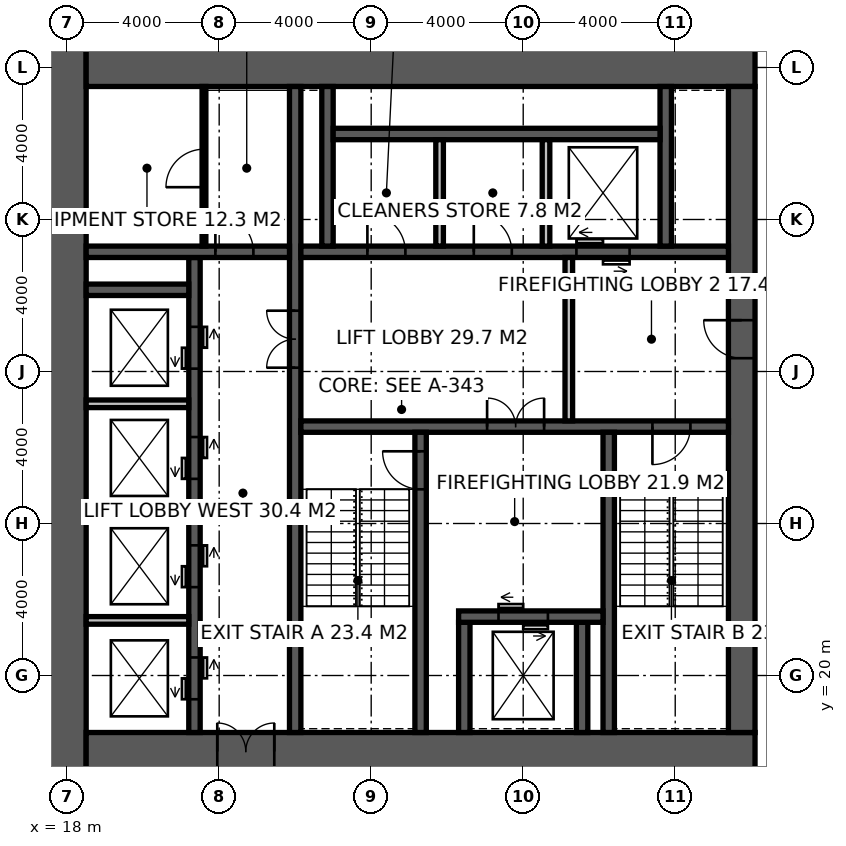
"""IFC4 building model, lengths in metres.
Left out: names, types, materials, properties, quantities, classifications, styles, units other than length and angle.
Written with IfcOpenShell. Run it as: python <this file> out.ifc"""

import sys

from ifc_helpers import new_model, si_unit, direction, frame, frame_2d, origin, place, context, subcontext, project, spatial, rectangle, extrude, element, fill, save


model = new_model("IFC4")
c1 = context("Model", 3, precision=1e-05, world=origin(), true_north=direction((0.0, 1.0)))
c2 = subcontext(c1, "Body", "Model", "MODEL_VIEW")
j1 = project(units=[si_unit("LENGTHUNIT", "METRE"), si_unit("PLANEANGLEUNIT", "RADIAN")], contexts=[c1])
p1 = place(None, origin())
s1 = spatial("IfcSite", under=j1, at=p1, CompositionType="ELEMENT")
p2 = place(p1, origin())
s2 = spatial("IfcBuilding", under=s1, at=p2, CompositionType="ELEMENT")
p3 = place(p2, frame((0.0, 0.0, 278.2)))
s3 = spatial("IfcBuildingStorey", under=s2, at=p3, CompositionType="ELEMENT", Elevation=278.2)
p4 = place(p3, frame((18.0, 17.5, -0.15), z_axis=(0.0, 0.0, 1.0), x_axis=(0.0, 1.0, 0.0)))
e1 = element("IfcWall", 1, at=p4, inside=s3, PredefinedType="SHEAR", context=c2, shape_type="SweptSolid", body=[
    extrude(rectangle(XDim=19.0, YDim=1.0, at=frame_2d((9.5, 0.0))), origin(), (0.0, 0.0, 1.0), 4.0),
])
p5 = place(p3, frame((18.5, 18.0, -0.15), z_axis=(0.0, 0.0, 1.0), x_axis=(1.0, 0.0, 0.0)))
e2 = element("IfcWall", 2, at=p5, inside=s3, PredefinedType="SHEAR", context=c2, shape_type="SweptSolid", body=[
    extrude(rectangle(XDim=17.6, YDim=1.0, at=frame_2d((8.8, 0.0))), origin(), (0.0, 0.0, 1.0), 4.0),
])
p6 = place(p5, frame((3.45, 0.0, 0.15)))
e3 = element("IfcOpeningElement", 3, at=p6, cuts=e2, PredefinedType="OPENING", context=c2, shape_type="SweptSolid", body=[
    extrude(rectangle(XDim=1.5, YDim=2.4, at=frame_2d((0.75, 1.2))), frame((0.0, 0.51, 0.0), z_axis=(0.0, -1.0, 0.0), x_axis=(1.0, 0.0, 0.0)), (0.0, 0.0, 1.0), 1.02),
])
p7 = place(p3, frame((18.5, 36.0, -0.15), z_axis=(0.0, 0.0, 1.0), x_axis=(1.0, 0.0, 0.0)))
e4 = element("IfcWall", 4, at=p7, inside=s3, PredefinedType="SHEAR", context=c2, shape_type="SweptSolid", body=[
    extrude(rectangle(XDim=17.6, YDim=1.0, at=frame_2d((8.8, 0.0))), origin(), (0.0, 0.0, 1.0), 4.0),
])
p8 = place(p3, frame((35.75, 18.5, -0.15), z_axis=(0.0, 0.0, 1.0), x_axis=(0.0, 1.0, 0.0)))
e5 = element("IfcWall", 5, at=p8, inside=s3, PredefinedType="SHEAR", context=c2, shape_type="SweptSolid", body=[
    extrude(rectangle(XDim=17.0, YDim=0.7, at=frame_2d((8.5, 0.0))), origin(), (0.0, 0.0, 1.0), 4.0),
])
p9 = place(p8, frame((9.85, 0.0, 0.15)))
e6 = element("IfcOpeningElement", 6, at=p9, cuts=e5, PredefinedType="OPENING", context=c2, shape_type="SweptSolid", body=[
    extrude(rectangle(XDim=1.0, YDim=2.2, at=frame_2d((0.5, 1.1))), frame((0.0, 0.36, 0.0), z_axis=(0.0, -1.0, 0.0), x_axis=(1.0, 0.0, 0.0)), (0.0, 0.0, 1.0), 0.72),
])
p10 = place(p3, frame((24.0, 18.5, -0.15), z_axis=(0.0, 0.0, 1.0), x_axis=(0.0, 1.0, 0.0)))
e7 = element("IfcWall", 7, at=p10, inside=s3, PredefinedType="SHEAR", context=c2, shape_type="SweptSolid", body=[
    extrude(rectangle(XDim=17.0, YDim=0.3, at=frame_2d((8.5, 0.0))), origin(), (0.0, 0.0, 1.0), 4.0),
])
p11 = place(p10, frame((9.6, 0.0, 0.15)))
e8 = element("IfcOpeningElement", 8, at=p11, cuts=e7, PredefinedType="OPENING", context=c2, shape_type="SweptSolid", body=[
    extrude(rectangle(XDim=1.5, YDim=2.4, at=frame_2d((0.75, 1.2))), frame((0.0, 0.16, 0.0), z_axis=(0.0, -1.0, 0.0), x_axis=(1.0, 0.0, 0.0)), (0.0, 0.0, 1.0), 0.32),
])
p12 = place(p3, frame((24.15, 26.55, -0.15), z_axis=(0.0, 0.0, 1.0), x_axis=(1.0, 0.0, 0.0)))
e9 = element("IfcWall", 9, at=p12, inside=s3, PredefinedType="SHEAR", context=c2, shape_type="SweptSolid", body=[
    extrude(rectangle(XDim=11.25, YDim=0.3, at=frame_2d((5.625, 0.0))), origin(), (0.0, 0.0, 1.0), 4.0),
])
p13 = place(p12, frame((9.25, 0.0, 0.15)))
e10 = element("IfcOpeningElement", 10, at=p13, cuts=e9, PredefinedType="OPENING", context=c2, shape_type="SweptSolid", body=[
    extrude(rectangle(XDim=1.0, YDim=2.2, at=frame_2d((0.5, 1.1))), frame((0.0, 0.16, 0.0), z_axis=(0.0, -1.0, 0.0), x_axis=(1.0, 0.0, 0.0)), (0.0, 0.0, 1.0), 0.32),
])
p14 = place(p12, frame((4.9, 0.0, 0.15)))
e11 = element("IfcOpeningElement", 11, at=p14, cuts=e9, PredefinedType="OPENING", context=c2, shape_type="SweptSolid", body=[
    extrude(rectangle(XDim=1.5, YDim=2.4, at=frame_2d((0.75, 1.2))), frame((0.0, 0.16, 0.0), z_axis=(0.0, -1.0, 0.0), x_axis=(1.0, 0.0, 0.0)), (0.0, 0.0, 1.0), 0.32),
])
p15 = place(p3, frame((27.3, 18.5, -0.15), z_axis=(0.0, 0.0, 1.0), x_axis=(0.0, 1.0, 0.0)))
e12 = element("IfcWall", 12, at=p15, inside=s3, PredefinedType="SHEAR", context=c2, shape_type="SweptSolid", body=[
    extrude(rectangle(XDim=7.9, YDim=0.3, at=frame_2d((3.95, 0.0))), origin(), (0.0, 0.0, 1.0), 4.0),
])
p16 = place(p15, frame((6.4, 0.0, 0.15)))
e13 = element("IfcOpeningElement", 13, at=p16, cuts=e12, PredefinedType="OPENING", context=c2, shape_type="SweptSolid", body=[
    extrude(rectangle(XDim=1.0, YDim=2.2, at=frame_2d((0.5, 1.1))), frame((0.0, 0.16, 0.0), z_axis=(0.0, -1.0, 0.0), x_axis=(1.0, 0.0, 0.0)), (0.0, 0.0, 1.0), 0.32),
])
p17 = place(p3, frame((32.25, 18.5, -0.15), z_axis=(0.0, 0.0, 1.0), x_axis=(0.0, 1.0, 0.0)))
e14 = element("IfcWall", 14, at=p17, inside=s3, PredefinedType="SHEAR", context=c2, shape_type="SweptSolid", body=[
    extrude(rectangle(XDim=7.9, YDim=0.3, at=frame_2d((3.95, 0.0))), origin(), (0.0, 0.0, 1.0), 4.0),
])
for number, where, z_axis, x_axis in (
    (15, (28.45, 18.5, -0.15), (0.0, 0.0, 1.0), (0.0, 1.0, 0.0)),
    (16, (31.55, 18.5, -0.15), (0.0, 0.0, 1.0), (0.0, 1.0, 0.0)),
):
    element("IfcWall", number, at=place(p3, frame(where, z_axis=z_axis, x_axis=x_axis)), inside=s3, PredefinedType="SHEAR", context=c2, shape_type="SweptSolid", body=[
        extrude(rectangle(XDim=2.9, YDim=0.3, at=frame_2d((1.45, 0.0))), origin(), (0.0, 0.0, 1.0), 4.0),
    ])
p18 = place(p3, frame((28.3, 21.55, -0.15), z_axis=(0.0, 0.0, 1.0), x_axis=(1.0, 0.0, 0.0)))
e17 = element("IfcWall", 17, at=p18, inside=s3, PredefinedType="SHEAR", context=c2, shape_type="SweptSolid", body=[
    extrude(rectangle(XDim=3.8, YDim=0.3, at=frame_2d((1.9, 0.0))), origin(), (0.0, 0.0, 1.0), 4.0),
])
p19 = place(p18, frame((1.05, 0.0, 0.15)))
e18 = element("IfcOpeningElement", 18, at=p19, cuts=e17, PredefinedType="OPENING", context=c2, shape_type="SweptSolid", body=[
    extrude(rectangle(XDim=1.3, YDim=2.4, at=frame_2d((0.65, 1.2))), frame((0.0, 0.16, 0.0), z_axis=(0.0, -1.0, 0.0), x_axis=(1.0, 0.0, 0.0)), (0.0, 0.0, 1.0), 0.32),
])
p20 = place(p3, frame((24.15, 31.15, -0.15), z_axis=(0.0, 0.0, 1.0), x_axis=(1.0, 0.0, 0.0)))
e19 = element("IfcWall", 19, at=p20, inside=s3, PredefinedType="SHEAR", context=c2, shape_type="SweptSolid", body=[
    extrude(rectangle(XDim=11.25, YDim=0.3, at=frame_2d((5.625, 0.0))), origin(), (0.0, 0.0, 1.0), 4.0),
])
p21 = place(p20, frame((1.75, 0.0, 0.15)))
e20 = element("IfcOpeningElement", 20, at=p21, cuts=e19, PredefinedType="OPENING", context=c2, shape_type="SweptSolid", body=[
    extrude(rectangle(XDim=1.0, YDim=2.2, at=frame_2d((0.5, 1.1))), frame((0.0, 0.16, 0.0), z_axis=(0.0, -1.0, 0.0), x_axis=(1.0, 0.0, 0.0)), (0.0, 0.0, 1.0), 0.32),
])
p22 = place(p20, frame((4.55, 0.0, 0.15)))
e21 = element("IfcOpeningElement", 21, at=p22, cuts=e19, PredefinedType="OPENING", context=c2, shape_type="SweptSolid", body=[
    extrude(rectangle(XDim=1.0, YDim=2.2, at=frame_2d((0.5, 1.1))), frame((0.0, 0.16, 0.0), z_axis=(0.0, -1.0, 0.0), x_axis=(1.0, 0.0, 0.0)), (0.0, 0.0, 1.0), 0.32),
])
p23 = place(p20, frame((7.25, 0.0, 0.15)))
e22 = element("IfcOpeningElement", 22, at=p23, cuts=e19, PredefinedType="OPENING", context=c2, shape_type="SweptSolid", body=[
    extrude(rectangle(XDim=1.4, YDim=2.4, at=frame_2d((0.7, 1.2))), frame((0.0, 0.16, 0.0), z_axis=(0.0, -1.0, 0.0), x_axis=(1.0, 0.0, 0.0)), (0.0, 0.0, 1.0), 0.32),
])
p24 = place(p3, frame((21.35, 18.5, -0.15), z_axis=(0.0, 0.0, 1.0), x_axis=(0.0, 1.0, 0.0)))
e23 = element("IfcWall", 23, at=p24, inside=s3, PredefinedType="SHEAR", context=c2, shape_type="SweptSolid", body=[
    extrude(rectangle(XDim=12.5, YDim=0.3, at=frame_2d((6.25, 0.0))), origin(), (0.0, 0.0, 1.0), 4.0),
])
p25 = place(p24, frame((0.875, 0.0, 0.15)))
e24 = element("IfcOpeningElement", 24, at=p25, cuts=e23, PredefinedType="OPENING", context=c2, shape_type="SweptSolid", body=[
    extrude(rectangle(XDim=1.1, YDim=2.2, at=frame_2d((0.55, 1.1))), frame((0.0, 0.16, 0.0), z_axis=(0.0, -1.0, 0.0), x_axis=(1.0, 0.0, 0.0)), (0.0, 0.0, 1.0), 0.32),
])
p26 = place(p24, frame((3.825, 0.0, 0.15)))
e25 = element("IfcOpeningElement", 25, at=p26, cuts=e23, PredefinedType="OPENING", context=c2, shape_type="SweptSolid", body=[
    extrude(rectangle(XDim=1.1, YDim=2.2, at=frame_2d((0.55, 1.1))), frame((0.0, 0.16, 0.0), z_axis=(0.0, -1.0, 0.0), x_axis=(1.0, 0.0, 0.0)), (0.0, 0.0, 1.0), 0.32),
])
p27 = place(p24, frame((6.675, 0.0, 0.15)))
e26 = element("IfcOpeningElement", 26, at=p27, cuts=e23, PredefinedType="OPENING", context=c2, shape_type="SweptSolid", body=[
    extrude(rectangle(XDim=1.1, YDim=2.2, at=frame_2d((0.55, 1.1))), frame((0.0, 0.16, 0.0), z_axis=(0.0, -1.0, 0.0), x_axis=(1.0, 0.0, 0.0)), (0.0, 0.0, 1.0), 0.32),
])
p28 = place(p24, frame((9.575, 0.0, 0.15)))
e27 = element("IfcOpeningElement", 27, at=p28, cuts=e23, PredefinedType="OPENING", context=c2, shape_type="SweptSolid", body=[
    extrude(rectangle(XDim=1.1, YDim=2.2, at=frame_2d((0.55, 1.1))), frame((0.0, 0.16, 0.0), z_axis=(0.0, -1.0, 0.0), x_axis=(1.0, 0.0, 0.0)), (0.0, 0.0, 1.0), 0.32),
])
p29 = place(p3, frame((18.5, 31.15, -0.15), z_axis=(0.0, 0.0, 1.0), x_axis=(1.0, 0.0, 0.0)))
e28 = element("IfcWall", 28, at=p29, inside=s3, PredefinedType="SHEAR", context=c2, shape_type="SweptSolid", body=[
    extrude(rectangle(XDim=5.35, YDim=0.3, at=frame_2d((2.675, 0.0))), origin(), (0.0, 0.0, 1.0), 4.0),
])
p30 = place(p29, frame((3.4, 0.0, 0.15)))
e29 = element("IfcOpeningElement", 29, at=p30, cuts=e28, PredefinedType="OPENING", context=c2, shape_type="SweptSolid", body=[
    extrude(rectangle(XDim=1.0, YDim=2.2, at=frame_2d((0.5, 1.1))), frame((0.0, 0.16, 0.0), z_axis=(0.0, -1.0, 0.0), x_axis=(1.0, 0.0, 0.0)), (0.0, 0.0, 1.0), 0.32),
])
p31 = place(p3, frame((18.5, 30.15, -0.15), z_axis=(0.0, 0.0, 1.0), x_axis=(1.0, 0.0, 0.0)))
e30 = element("IfcWall", 30, at=p31, inside=s3, PredefinedType="SHEAR", context=c2, shape_type="SweptSolid", body=[
    extrude(rectangle(XDim=2.7, YDim=0.3, at=frame_2d((1.35, 0.0))), origin(), (0.0, 0.0, 1.0), 4.0),
])
for number, where, z_axis, x_axis in (
    (31, (24.85, 31.3, -0.15), (0.0, 0.0, 1.0), (0.0, 1.0, 0.0)),
    (32, (33.75, 31.3, -0.15), (0.0, 0.0, 1.0), (0.0, 1.0, 0.0)),
):
    element("IfcWall", number, at=place(p3, frame(where, z_axis=z_axis, x_axis=x_axis)), inside=s3, PredefinedType="SHEAR", context=c2, shape_type="SweptSolid", body=[
        extrude(rectangle(XDim=4.2, YDim=0.3, at=frame_2d((2.1, 0.0))), origin(), (0.0, 0.0, 1.0), 4.0),
    ])
p32 = place(p3, frame((25.0, 34.25, -0.15), z_axis=(0.0, 0.0, 1.0), x_axis=(1.0, 0.0, 0.0)))
e33 = element("IfcWall", 33, at=p32, inside=s3, PredefinedType="SHEAR", context=c2, shape_type="SweptSolid", body=[
    extrude(rectangle(XDim=8.6, YDim=0.3, at=frame_2d((4.3, 0.0))), origin(), (0.0, 0.0, 1.0), 4.0),
])
for number, where, z_axis, x_axis in (
    (34, (27.8, 31.3, -0.15), (0.0, 0.0, 1.0), (0.0, 1.0, 0.0)),
    (35, (30.6, 31.3, -0.15), (0.0, 0.0, 1.0), (0.0, 1.0, 0.0)),
):
    element("IfcWall", number, at=place(p3, frame(where, z_axis=z_axis, x_axis=x_axis)), inside=s3, PredefinedType="SOLIDWALL", context=c2, shape_type="SweptSolid", body=[
        extrude(rectangle(XDim=2.8, YDim=0.2, at=frame_2d((1.4, 0.0))), origin(), (0.0, 0.0, 1.0), 4.0),
    ])
for number, where, z_axis, x_axis in (
    (36, (18.5, 21.45, -0.15), (0.0, 0.0, 1.0), (1.0, 0.0, 0.0)),
    (37, (18.5, 24.3, -0.15), (0.0, 0.0, 1.0), (1.0, 0.0, 0.0)),
    (38, (18.5, 27.15, -0.15), (0.0, 0.0, 1.0), (1.0, 0.0, 0.0)),
):
    element("IfcWall", number, at=place(p3, frame(where, z_axis=z_axis, x_axis=x_axis)), inside=s3, PredefinedType="SOLIDWALL", context=c2, shape_type="SweptSolid", body=[
        extrude(rectangle(XDim=2.7, YDim=0.2, at=frame_2d((1.35, 0.0))), origin(), (0.0, 0.0, 1.0), 4.0),
    ])
p33 = place(p3, frame((31.2, 26.7, 0.0), z_axis=(0.0, 0.0, 1.0), x_axis=(0.0, 1.0, 0.0)))
e39 = element("IfcWall", 39, at=p33, inside=s3, PredefinedType="SOLIDWALL", context=c2, shape_type="SweptSolid", body=[
    extrude(rectangle(XDim=4.3, YDim=0.2, at=frame_2d((2.15, 0.0))), origin(), (0.0, 0.0, 1.0), 3.85),
])
p34 = place(p3, frame((21.6, 31.3, 0.0), z_axis=(0.0, 0.0, 1.0), x_axis=(0.0, 1.0, 0.0)))
e40 = element("IfcWall", 40, at=p34, inside=s3, PredefinedType="PARTITIONING", context=c2, shape_type="SweptSolid", body=[
    extrude(rectangle(XDim=4.2, YDim=0.1, at=frame_2d((2.1, 0.0))), origin(), (0.0, 0.0, 1.0), 3.85),
])
p35 = place(p34, frame((1.55, 0.0, 0.0)))
e41 = element("IfcOpeningElement", 41, at=p35, cuts=e40, PredefinedType="OPENING", context=c2, shape_type="SweptSolid", body=[
    extrude(rectangle(XDim=1.0, YDim=2.2, at=frame_2d((0.5, 1.1))), frame((0.0, 0.06, 0.0), z_axis=(0.0, -1.0, 0.0), x_axis=(1.0, 0.0, 0.0)), (0.0, 0.0, 1.0), 0.12),
])
p36 = place(p16, origin())
e42 = element("IfcDoor", 42, at=p36, inside=s3, OperationType="SINGLE_SWING_RIGHT", PredefinedType="DOOR", context=c2, shape_type="SweptSolid", body=[
    extrude(rectangle(XDim=1.0, YDim=2.2, at=frame_2d((0.5, 1.1))), frame((0.0, 0.025, 0.0), z_axis=(0.0, -1.0, 0.0), x_axis=(1.0, 0.0, 0.0)), (0.0, 0.0, 1.0), 0.05),
])
fill(e13, e42)
p37 = place(p13, frame((1.0, 0.0, 0.0), z_axis=(0.0, 0.0, 1.0), x_axis=(-1.0, 0.0, 0.0)))
e43 = element("IfcDoor", 43, at=p37, inside=s3, OperationType="SINGLE_SWING_RIGHT", PredefinedType="DOOR", context=c2, shape_type="SweptSolid", body=[
    extrude(rectangle(XDim=1.0, YDim=2.2, at=frame_2d((0.5, 1.1))), frame((0.0, 0.025, 0.0), z_axis=(0.0, -1.0, 0.0), x_axis=(1.0, 0.0, 0.0)), (0.0, 0.0, 1.0), 0.05),
])
fill(e10, e43)
p38 = place(p9, origin())
e44 = element("IfcDoor", 44, at=p38, inside=s3, OperationType="SINGLE_SWING_RIGHT", PredefinedType="DOOR", context=c2, shape_type="SweptSolid", body=[
    extrude(rectangle(XDim=1.0, YDim=2.2, at=frame_2d((0.5, 1.1))), frame((0.0, 0.025, 0.0), z_axis=(0.0, -1.0, 0.0), x_axis=(1.0, 0.0, 0.0)), (0.0, 0.0, 1.0), 0.05),
])
fill(e6, e44)
p39 = place(p14, origin())
e45 = element("IfcDoor", 45, at=p39, inside=s3, OperationType="DOUBLE_DOOR_DOUBLE_SWING", PredefinedType="DOOR", context=c2, shape_type="SweptSolid", body=[
    extrude(rectangle(XDim=1.5, YDim=2.4, at=frame_2d((0.75, 1.2))), frame((0.0, 0.025, 0.0), z_axis=(0.0, -1.0, 0.0), x_axis=(1.0, 0.0, 0.0)), (0.0, 0.0, 1.0), 0.05),
])
fill(e11, e45)
p40 = place(p11, origin())
e46 = element("IfcDoor", 46, at=p40, inside=s3, OperationType="DOUBLE_DOOR_DOUBLE_SWING", PredefinedType="DOOR", context=c2, shape_type="SweptSolid", body=[
    extrude(rectangle(XDim=1.5, YDim=2.4, at=frame_2d((0.75, 1.2))), frame((0.0, 0.025, 0.0), z_axis=(0.0, -1.0, 0.0), x_axis=(1.0, 0.0, 0.0)), (0.0, 0.0, 1.0), 0.05),
])
fill(e8, e46)
p41 = place(p30, origin())
e47 = element("IfcDoor", 47, at=p41, inside=s3, OperationType="SINGLE_SWING_LEFT", PredefinedType="DOOR", context=c2, shape_type="SweptSolid", body=[
    extrude(rectangle(XDim=1.0, YDim=2.2, at=frame_2d((0.5, 1.1))), frame((0.0, 0.025, 0.0), z_axis=(0.0, -1.0, 0.0), x_axis=(1.0, 0.0, 0.0)), (0.0, 0.0, 1.0), 0.05),
])
fill(e29, e47)
p42 = place(p35, origin())
e48 = element("IfcDoor", 48, at=p42, inside=s3, OperationType="SINGLE_SWING_LEFT", PredefinedType="DOOR", context=c2, shape_type="SweptSolid", body=[
    extrude(rectangle(XDim=1.0, YDim=2.2, at=frame_2d((0.5, 1.1))), frame((0.0, 0.025, 0.0), z_axis=(0.0, -1.0, 0.0), x_axis=(1.0, 0.0, 0.0)), (0.0, 0.0, 1.0), 0.05),
])
fill(e41, e48)
p43 = place(p21, origin())
e49 = element("IfcDoor", 49, at=p43, inside=s3, OperationType="SINGLE_SWING_LEFT", PredefinedType="DOOR", context=c2, shape_type="SweptSolid", body=[
    extrude(rectangle(XDim=1.0, YDim=2.2, at=frame_2d((0.5, 1.1))), frame((0.0, 0.025, 0.0), z_axis=(0.0, -1.0, 0.0), x_axis=(1.0, 0.0, 0.0)), (0.0, 0.0, 1.0), 0.05),
])
fill(e20, e49)
p44 = place(p22, origin())
e50 = element("IfcDoor", 50, at=p44, inside=s3, OperationType="SINGLE_SWING_LEFT", PredefinedType="DOOR", context=c2, shape_type="SweptSolid", body=[
    extrude(rectangle(XDim=1.0, YDim=2.2, at=frame_2d((0.5, 1.1))), frame((0.0, 0.025, 0.0), z_axis=(0.0, -1.0, 0.0), x_axis=(1.0, 0.0, 0.0)), (0.0, 0.0, 1.0), 0.05),
])
fill(e21, e50)
p45 = place(p6, origin())
e51 = element("IfcDoor", 51, at=p45, inside=s3, OperationType="DOUBLE_DOOR_DOUBLE_SWING", PredefinedType="DOOR", context=c2, shape_type="SweptSolid", body=[
    extrude(rectangle(XDim=1.5, YDim=2.4, at=frame_2d((0.75, 1.2))), frame((0.0, 0.025, 0.0), z_axis=(0.0, -1.0, 0.0), x_axis=(1.0, 0.0, 0.0)), (0.0, 0.0, 1.0), 0.05),
])
fill(e3, e51)
p46 = place(p19, origin())
e52 = element("IfcDoor", 52, at=p46, inside=s3, OperationType="DOUBLE_DOOR_SLIDING", PredefinedType="DOOR", context=c2, shape_type="SweptSolid", body=[
    extrude(rectangle(XDim=1.3, YDim=2.4, at=frame_2d((0.65, 1.2))), frame((0.0, 0.025, 0.0), z_axis=(0.0, -1.0, 0.0), x_axis=(1.0, 0.0, 0.0)), (0.0, 0.0, 1.0), 0.05),
])
fill(e18, e52)
p47 = place(p23, origin())
e53 = element("IfcDoor", 53, at=p47, inside=s3, OperationType="DOUBLE_DOOR_SLIDING", PredefinedType="DOOR", context=c2, shape_type="SweptSolid", body=[
    extrude(rectangle(XDim=1.4, YDim=2.4, at=frame_2d((0.7, 1.2))), frame((0.0, 0.025, 0.0), z_axis=(0.0, -1.0, 0.0), x_axis=(1.0, 0.0, 0.0)), (0.0, 0.0, 1.0), 0.05),
])
fill(e22, e53)
p48 = place(p25, origin())
e54 = element("IfcDoor", 54, at=p48, inside=s3, OperationType="DOUBLE_DOOR_SLIDING", PredefinedType="DOOR", context=c2, shape_type="SweptSolid", body=[
    extrude(rectangle(XDim=1.1, YDim=2.2, at=frame_2d((0.55, 1.1))), frame((0.0, 0.025, 0.0), z_axis=(0.0, -1.0, 0.0), x_axis=(1.0, 0.0, 0.0)), (0.0, 0.0, 1.0), 0.05),
])
fill(e24, e54)
p49 = place(p26, origin())
e55 = element("IfcDoor", 55, at=p49, inside=s3, OperationType="DOUBLE_DOOR_SLIDING", PredefinedType="DOOR", context=c2, shape_type="SweptSolid", body=[
    extrude(rectangle(XDim=1.1, YDim=2.2, at=frame_2d((0.55, 1.1))), frame((0.0, 0.025, 0.0), z_axis=(0.0, -1.0, 0.0), x_axis=(1.0, 0.0, 0.0)), (0.0, 0.0, 1.0), 0.05),
])
fill(e25, e55)
p50 = place(p27, origin())
e56 = element("IfcDoor", 56, at=p50, inside=s3, OperationType="DOUBLE_DOOR_SLIDING", PredefinedType="DOOR", context=c2, shape_type="SweptSolid", body=[
    extrude(rectangle(XDim=1.1, YDim=2.2, at=frame_2d((0.55, 1.1))), frame((0.0, 0.025, 0.0), z_axis=(0.0, -1.0, 0.0), x_axis=(1.0, 0.0, 0.0)), (0.0, 0.0, 1.0), 0.05),
])
fill(e26, e56)
p51 = place(p28, origin())
e57 = element("IfcDoor", 57, at=p51, inside=s3, OperationType="DOUBLE_DOOR_SLIDING", PredefinedType="DOOR", context=c2, shape_type="SweptSolid", body=[
    extrude(rectangle(XDim=1.1, YDim=2.2, at=frame_2d((0.55, 1.1))), frame((0.0, 0.025, 0.0), z_axis=(0.0, -1.0, 0.0), x_axis=(1.0, 0.0, 0.0)), (0.0, 0.0, 1.0), 0.05),
])
fill(e27, e57)
save(model, sys.argv[1])
